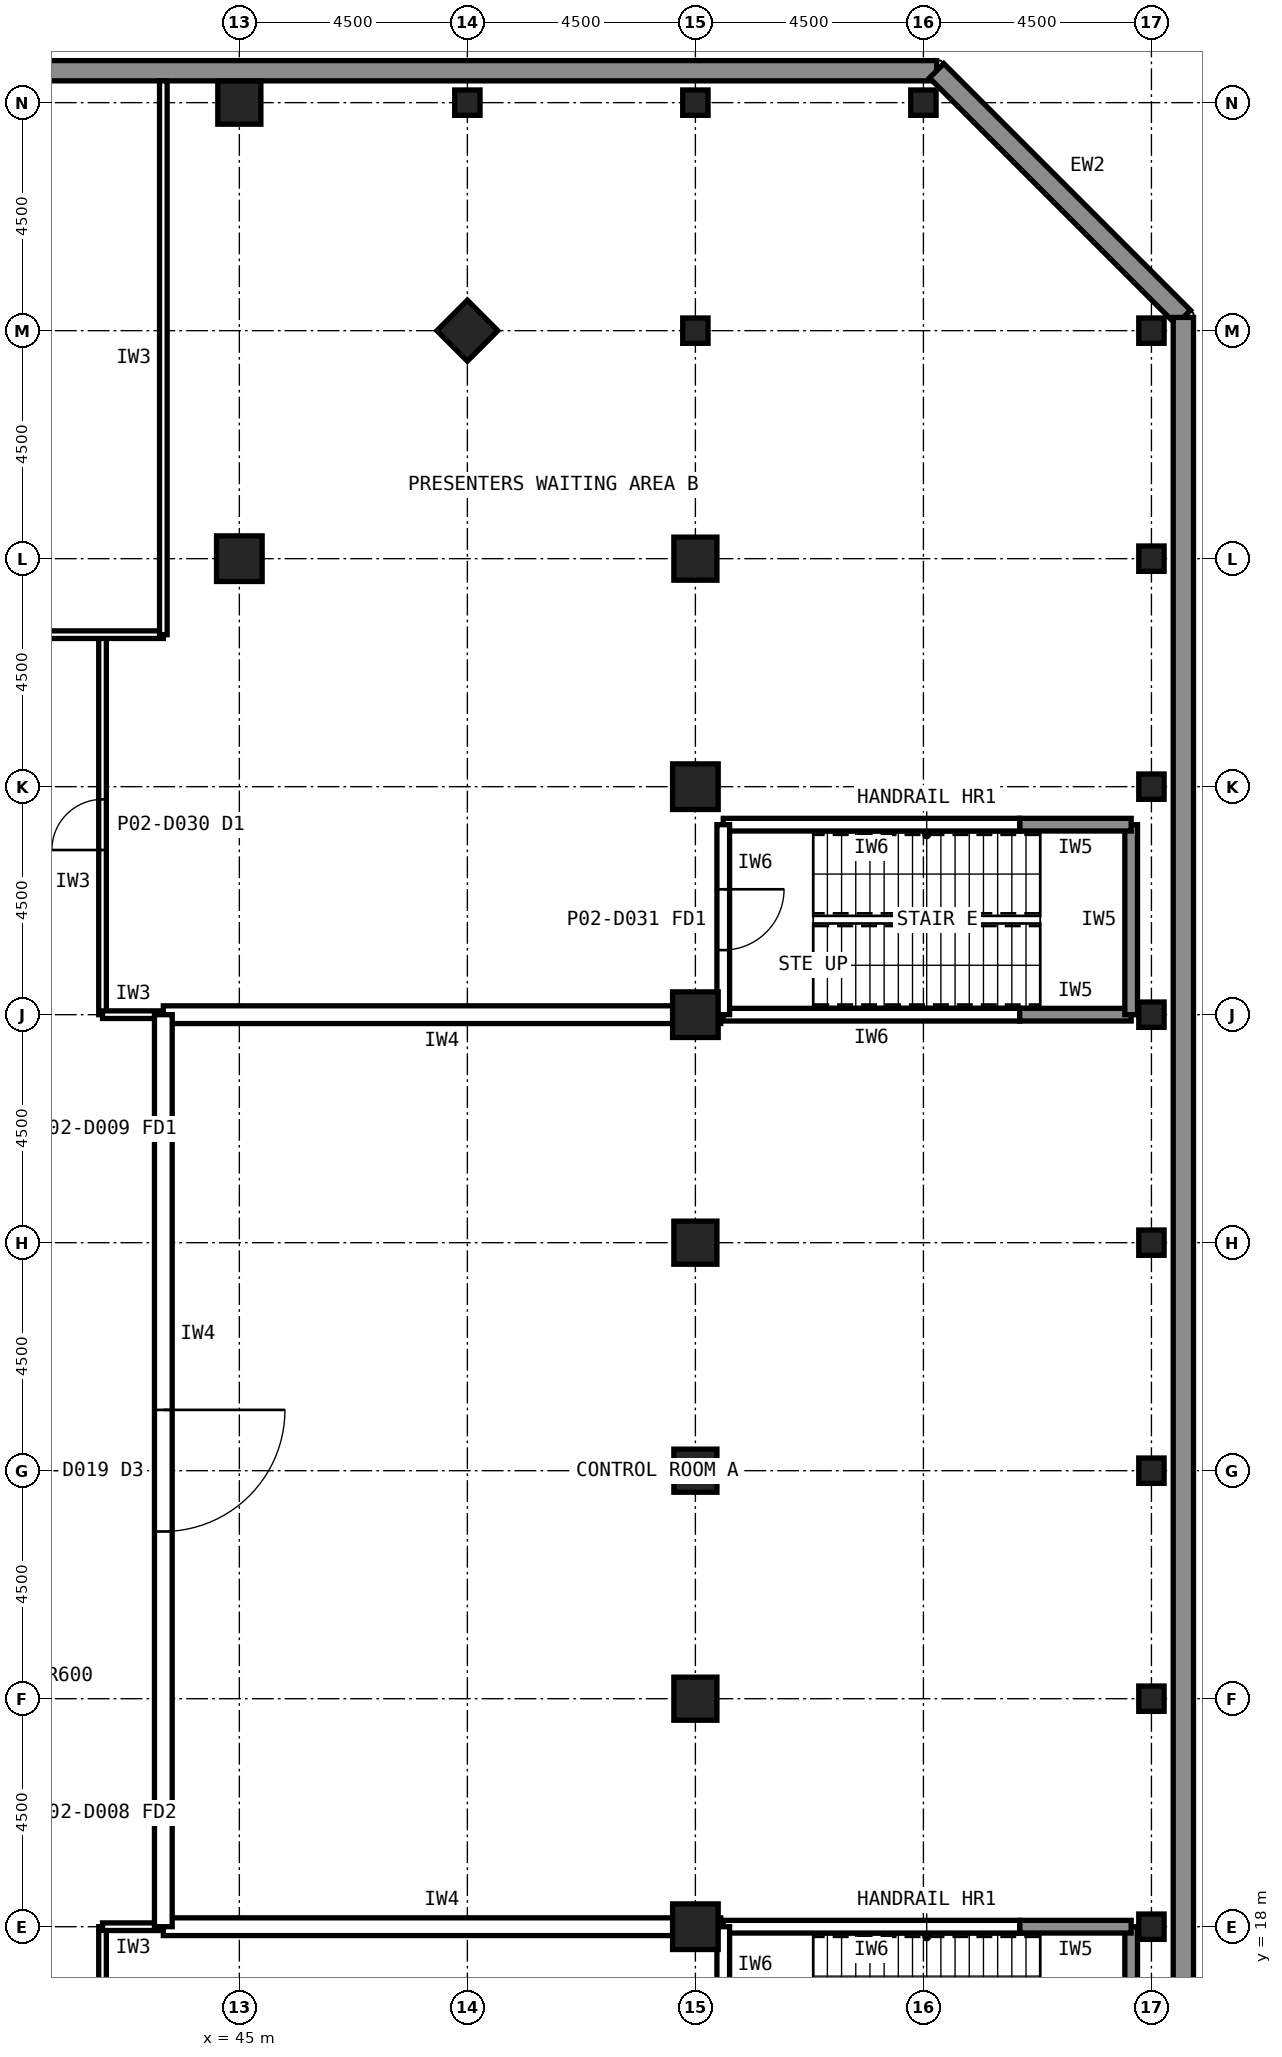
"""IFC4 building model, lengths in metres.
Left out: names, types, materials, properties, quantities, classifications, styles, units other than length and angle.
Written with IfcOpenShell. Run it as: python <this file> out.ifc"""

import sys

from ifc_helpers import new_model, si_unit, direction, frame, frame_2d, origin, origin_2d, place, context, subcontext, project, spatial, rectangle, hollow_rectangle, extrude, element, fill, save


model = new_model("IFC4")
c1 = context("Model", 3, precision=1e-05, world=origin(), true_north=direction((0.0, 1.0)))
c2 = subcontext(c1, "Body", "Model", "MODEL_VIEW")
j1 = project(units=[si_unit("LENGTHUNIT", "METRE"), si_unit("PLANEANGLEUNIT", "RADIAN")], contexts=[c1])
p1 = place(None, origin())
s1 = spatial("IfcSite", under=j1, at=p1, CompositionType="ELEMENT")
p2 = place(p1, origin())
s2 = spatial("IfcBuilding", under=s1, at=p2, CompositionType="ELEMENT")
p3 = place(p2, frame((0.0, 0.0, 6.0)))
s3 = spatial("IfcBuildingStorey", under=s2, at=p3, CompositionType="ELEMENT", Elevation=6.0)
p4 = place(p3, frame((54.0, 18.0, 0.0), z_axis=(0.0, 0.0, 1.0), x_axis=(1.0, 0.0, 0.0)))
e1 = element("IfcColumn", 1, at=p4, inside=s3, PredefinedType="COLUMN", context=c2, shape_type="SweptSolid", body=[
    extrude(hollow_rectangle(XDim=0.9, YDim=0.9, WallThickness=0.063, at=origin_2d()), origin(), (0.0, 0.0, 1.0), 6.0),
])
for number, where, z_axis, x_axis in (
    (2, (54.0, 22.5, 0.0), (0.0, 0.0, 1.0), (1.0, 0.0, 0.0)),
    (3, (54.0, 27.0, 0.0), (0.0, 0.0, 1.0), (1.0, 0.0, 0.0)),
    (4, (54.0, 31.5, 0.0), (0.0, 0.0, 1.0), (1.0, 0.0, 0.0)),
):
    element("IfcColumn", number, at=place(p3, frame(where, z_axis=z_axis, x_axis=x_axis)), inside=s3, PredefinedType="COLUMN", context=c2, shape_type="SweptSolid", body=[
        extrude(hollow_rectangle(XDim=0.85, YDim=0.85, WallThickness=0.05, at=origin_2d()), origin(), (0.0, 0.0, 1.0), 6.0),
    ])
for number, where, z_axis, x_axis in (
    (5, (54.0, 36.0, 0.0), (0.0, 0.0, 1.0), (1.0, 0.0, 0.0)),
    (6, (54.0, 40.5, 0.0), (0.0, 0.0, 1.0), (1.0, 0.0, 0.0)),
):
    element("IfcColumn", number, at=place(p3, frame(where, z_axis=z_axis, x_axis=x_axis)), inside=s3, PredefinedType="COLUMN", context=c2, shape_type="SweptSolid", body=[
        extrude(hollow_rectangle(XDim=0.9, YDim=0.9, WallThickness=0.063, at=origin_2d()), origin(), (0.0, 0.0, 1.0), 6.0),
    ])
for number, where, z_axis, x_axis in (
    (7, (54.0, 45.0, 0.0), (0.0, 0.0, 1.0), (1.0, 0.0, 0.0)),
    (8, (45.0, 54.0, 0.0), (0.0, 0.0, 1.0), (1.0, 0.0, 0.0)),
    (9, (49.5, 49.5, 0.0), (0.0, 0.0, 1.0), (0.707, 0.707, 0.0)),
):
    element("IfcColumn", number, at=place(p3, frame(where, z_axis=z_axis, x_axis=x_axis)), inside=s3, PredefinedType="COLUMN", context=c2, shape_type="SweptSolid", body=[
        extrude(hollow_rectangle(XDim=0.85, YDim=0.85, WallThickness=0.05, at=origin_2d()), origin(), (0.0, 0.0, 1.0), 6.0),
    ])
p5 = place(p3, frame((45.0, 45.0, 0.0), z_axis=(0.0, 0.0, 1.0), x_axis=(1.0, 0.0, 0.0)))
e10 = element("IfcColumn", 10, at=p5, inside=s3, PredefinedType="COLUMN", context=c2, shape_type="SweptSolid", body=[
    extrude(hollow_rectangle(XDim=0.9, YDim=0.9, WallThickness=0.063, at=origin_2d()), origin(), (0.0, 0.0, 1.0), 6.0),
])
for number, where, z_axis, x_axis in (
    (11, (63.0, 18.0, 0.0), (0.0, 0.0, 1.0), (1.0, 0.0, 0.0)),
    (12, (63.0, 22.5, 0.0), (0.0, 0.0, 1.0), (1.0, 0.0, 0.0)),
    (13, (63.0, 27.0, 0.0), (0.0, 0.0, 1.0), (1.0, 0.0, 0.0)),
    (14, (63.0, 31.5, 0.0), (0.0, 0.0, 1.0), (1.0, 0.0, 0.0)),
    (15, (63.0, 36.0, 0.0), (0.0, 0.0, 1.0), (1.0, 0.0, 0.0)),
    (16, (63.0, 40.5, 0.0), (0.0, 0.0, 1.0), (1.0, 0.0, 0.0)),
    (17, (63.0, 45.0, 0.0), (0.0, 0.0, 1.0), (1.0, 0.0, 0.0)),
    (18, (63.0, 49.5, 0.0), (0.0, 0.0, 1.0), (1.0, 0.0, 0.0)),
    (19, (58.5, 54.0, 0.0), (0.0, 0.0, 1.0), (1.0, 0.0, 0.0)),
    (20, (54.0, 54.0, 0.0), (0.0, 0.0, 1.0), (1.0, 0.0, 0.0)),
    (21, (49.5, 54.0, 0.0), (0.0, 0.0, 1.0), (1.0, 0.0, 0.0)),
    (22, (54.0, 49.5, 0.0), (0.0, 0.0, 1.0), (1.0, 0.0, 0.0)),
):
    element("IfcColumn", number, at=place(p3, frame(where, z_axis=z_axis, x_axis=x_axis)), inside=s3, PredefinedType="COLUMN", context=c2, shape_type="SweptSolid", body=[
        extrude(hollow_rectangle(XDim=0.5, YDim=0.5, WallThickness=0.022, at=origin_2d()), origin(), (0.0, 0.0, 1.0), 6.0),
    ])
p6 = place(p3, frame((-4.761, 54.63, 0.0), z_axis=(0.0, 0.0, 1.0), x_axis=(1.0, 0.0, 0.0)))
e23 = element("IfcWall", 23, at=p6, inside=s3, PredefinedType="SOLIDWALL", context=c2, shape_type="SweptSolid", body=[
    extrude(rectangle(XDim=63.522, YDim=0.4, at=frame_2d((31.761, 0.0))), origin(), (0.0, 0.0, 1.0), 6.0),
])
p7 = place(p3, frame((58.761, 54.63, 0.0), z_axis=(0.0, 0.0, 1.0), x_axis=(0.707106781187, -0.707106781187, 0.0)))
e24 = element("IfcWall", 24, at=p7, inside=s3, PredefinedType="SOLIDWALL", context=c2, shape_type="SweptSolid", body=[
    extrude(rectangle(XDim=6.886, YDim=0.4, at=frame_2d((3.443, 0.0))), origin(), (0.0, 0.0, 1.0), 6.0),
])
p8 = place(p3, frame((63.63, 49.761, 0.0), z_axis=(0.0, 0.0, 1.0), x_axis=(0.0, -1.0, 0.0)))
e25 = element("IfcWall", 25, at=p8, inside=s3, PredefinedType="SOLIDWALL", context=c2, shape_type="SweptSolid", body=[
    extrude(rectangle(XDim=45.522, YDim=0.4, at=frame_2d((22.761, 0.0))), origin(), (0.0, 0.0, 1.0), 6.0),
])
p9 = place(p3, frame((42.3, 10.5, 0.0), z_axis=(0.0, 0.0, 1.0), x_axis=(0.0, 1.0, 0.0)))
e26 = element("IfcWall", 26, at=p9, inside=s3, PredefinedType="PARTITIONING", context=c2, shape_type="SweptSolid", body=[
    extrude(rectangle(XDim=7.5, YDim=0.15, at=frame_2d((3.75, 0.0))), origin(), (0.0, 0.0, 1.0), 5.8),
])
p10 = place(p9, frame((3.25, 0.0, 0.0)))
e27 = element("IfcOpeningElement", 27, at=p10, cuts=e26, PredefinedType="OPENING", context=c2, shape_type="SweptSolid", body=[
    extrude(rectangle(XDim=1.0, YDim=2.1, at=frame_2d((0.5, 1.05))), frame((0.0, 0.085, 0.0), z_axis=(0.0, -1.0, 0.0), x_axis=(1.0, 0.0, 0.0)), (0.0, 0.0, 1.0), 0.17),
])
p11 = place(p3, frame((42.3, 18.0, 0.0), z_axis=(0.0, 0.0, 1.0), x_axis=(1.0, 0.0, 0.0)))
e28 = element("IfcWall", 28, at=p11, inside=s3, PredefinedType="PARTITIONING", context=c2, shape_type="SweptSolid", body=[
    extrude(rectangle(XDim=1.21, YDim=0.15, at=frame_2d((0.605, 0.0))), origin(), (0.0, 0.0, 1.0), 4.881),
])
p12 = place(p3, frame((42.3, 36.0, 0.0), z_axis=(0.0, 0.0, 1.0), x_axis=(0.0, 1.0, 0.0)))
e29 = element("IfcWall", 29, at=p12, inside=s3, PredefinedType="PARTITIONING", context=c2, shape_type="SweptSolid", body=[
    extrude(rectangle(XDim=7.5, YDim=0.15, at=frame_2d((3.75, 0.0))), origin(), (0.0, 0.0, 1.0), 5.8),
])
p13 = place(p12, frame((3.25, 0.0, 0.0)))
e30 = element("IfcOpeningElement", 30, at=p13, cuts=e29, PredefinedType="OPENING", context=c2, shape_type="SweptSolid", body=[
    extrude(rectangle(XDim=1.0, YDim=2.1, at=frame_2d((0.5, 1.05))), frame((0.0, 0.085, 0.0), z_axis=(0.0, -1.0, 0.0), x_axis=(1.0, 0.0, 0.0)), (0.0, 0.0, 1.0), 0.17),
])
p14 = place(p3, frame((43.51, 36.0, 0.0), z_axis=(0.0, 0.0, 1.0), x_axis=(-1.0, 0.0, 0.0)))
e31 = element("IfcWall", 31, at=p14, inside=s3, PredefinedType="PARTITIONING", context=c2, shape_type="SweptSolid", body=[
    extrude(rectangle(XDim=1.21, YDim=0.15, at=frame_2d((0.605, 0.0))), origin(), (0.0, 0.0, 1.0), 4.881),
])
for number, where, z_axis, x_axis in (
    (32, (43.5, 18.0, 0.0), (0.0, 0.0, 1.0), (1.0, 0.0, 0.0)),
    (33, (54.5, 36.0, 0.0), (0.0, 0.0, 1.0), (-1.0, 0.0, 0.0)),
):
    element("IfcWall", number, at=place(p3, frame(where, z_axis=z_axis, x_axis=x_axis)), inside=s3, PredefinedType="PARTITIONING", context=c2, shape_type="SweptSolid", body=[
        extrude(rectangle(XDim=11.0, YDim=0.35, at=frame_2d((5.5, 0.0))), origin(), (0.0, 0.0, 1.0), 4.881),
    ])
p15 = place(p3, frame((43.5, 36.0, 0.0), z_axis=(0.0, 0.0, 1.0), x_axis=(0.0, -1.0, 0.0)))
e34 = element("IfcWall", 34, at=p15, inside=s3, PredefinedType="PARTITIONING", context=c2, shape_type="SweptSolid", body=[
    extrude(rectangle(XDim=18.0, YDim=0.35, at=frame_2d((9.0, 0.0))), origin(), (0.0, 0.0, 1.0), 5.8),
])
p16 = place(p15, frame((7.8, 0.0, 0.0)))
e35 = element("IfcOpeningElement", 35, at=p16, cuts=e34, PredefinedType="OPENING", context=c2, shape_type="SweptSolid", body=[
    extrude(rectangle(XDim=2.4, YDim=3.0, at=frame_2d((1.2, 1.5))), frame((0.0, 0.185, 0.0), z_axis=(0.0, -1.0, 0.0), x_axis=(1.0, 0.0, 0.0)), (0.0, 0.0, 1.0), 0.37),
])
p17 = place(p3, frame((10.5, 43.5, 0.0), z_axis=(0.0, 0.0, 1.0), x_axis=(1.0, 0.0, 0.0)))
e36 = element("IfcWall", 36, at=p17, inside=s3, PredefinedType="PARTITIONING", context=c2, shape_type="SweptSolid", body=[
    extrude(rectangle(XDim=33.0, YDim=0.15, at=frame_2d((16.5, 0.0))), origin(), (0.0, 0.0, 1.0), 5.8),
])
p18 = place(p17, frame((16.0, 0.0, 0.0)))
e37 = element("IfcOpeningElement", 37, at=p18, cuts=e36, PredefinedType="OPENING", context=c2, shape_type="SweptSolid", body=[
    extrude(rectangle(XDim=1.0, YDim=2.1, at=frame_2d((0.5, 1.05))), frame((0.0, 0.085, 0.0), z_axis=(0.0, -1.0, 0.0), x_axis=(1.0, 0.0, 0.0)), (0.0, 0.0, 1.0), 0.17),
])
p19 = place(p3, frame((43.5, 43.5, 0.0), z_axis=(0.0, 0.0, 1.0), x_axis=(0.0, 1.0, 0.0)))
e38 = element("IfcWall", 38, at=p19, inside=s3, PredefinedType="PARTITIONING", context=c2, shape_type="SweptSolid", body=[
    extrude(rectangle(XDim=10.93, YDim=0.15, at=frame_2d((5.465, 0.0))), origin(), (0.0, 0.0, 1.0), 5.8),
])
p20 = place(p3, frame((62.6, 14.25, 0.0), z_axis=(0.0, 0.0, 1.0), x_axis=(0.0, 1.0, 0.0)))
e39 = element("IfcWall", 39, at=p20, inside=s3, PredefinedType="SOLIDWALL", context=c2, shape_type="SweptSolid", body=[
    extrude(rectangle(XDim=3.75, YDim=0.25, at=frame_2d((1.875, 0.0))), origin(), (0.0, 0.0, 1.0), 6.0),
])
p21 = place(p3, frame((62.6, 18.0, 0.0), z_axis=(0.0, 0.0, 1.0), x_axis=(-1.0, 0.0, 0.0)))
e40 = element("IfcWall", 40, at=p21, inside=s3, PredefinedType="SOLIDWALL", context=c2, shape_type="SweptSolid", body=[
    extrude(rectangle(XDim=2.2, YDim=0.25, at=frame_2d((1.1, 0.0))), origin(), (0.0, 0.0, 1.0), 5.189),
])
p22 = place(p3, frame((60.4, 18.0, 0.0), z_axis=(0.0, 0.0, 1.0), x_axis=(-1.0, 0.0, 0.0)))
e41 = element("IfcWall", 41, at=p22, inside=s3, PredefinedType="PARTITIONING", context=c2, shape_type="SweptSolid", body=[
    extrude(rectangle(XDim=5.85, YDim=0.25, at=frame_2d((2.925, 0.0))), origin(), (0.0, 0.0, 1.0), 5.189),
])
p23 = place(p3, frame((54.55, 18.0, 0.0), z_axis=(0.0, 0.0, 1.0), x_axis=(0.0, -1.0, 0.0)))
e42 = element("IfcWall", 42, at=p23, inside=s3, PredefinedType="PARTITIONING", context=c2, shape_type="SweptSolid", body=[
    extrude(rectangle(XDim=3.75, YDim=0.25, at=frame_2d((1.875, 0.0))), origin(), (0.0, 0.0, 1.0), 5.8),
])
p24 = place(p23, frame((1.275, 0.0, 0.0)))
e43 = element("IfcOpeningElement", 43, at=p24, cuts=e42, PredefinedType="OPENING", context=c2, shape_type="SweptSolid", body=[
    extrude(rectangle(XDim=1.2, YDim=2.1, at=frame_2d((0.6, 1.05))), frame((0.0, 0.135, 0.0), z_axis=(0.0, -1.0, 0.0), x_axis=(1.0, 0.0, 0.0)), (0.0, 0.0, 1.0), 0.27),
])
p25 = place(p3, frame((54.55, 36.0, 0.0), z_axis=(0.0, 0.0, 1.0), x_axis=(1.0, 0.0, 0.0)))
e44 = element("IfcWall", 44, at=p25, inside=s3, PredefinedType="PARTITIONING", context=c2, shape_type="SweptSolid", body=[
    extrude(rectangle(XDim=5.85, YDim=0.25, at=frame_2d((2.925, 0.0))), origin(), (0.0, 0.0, 1.0), 5.189),
])
p26 = place(p3, frame((60.4, 36.0, 0.0), z_axis=(0.0, 0.0, 1.0), x_axis=(1.0, 0.0, 0.0)))
e45 = element("IfcWall", 45, at=p26, inside=s3, PredefinedType="SOLIDWALL", context=c2, shape_type="SweptSolid", body=[
    extrude(rectangle(XDim=2.2, YDim=0.25, at=frame_2d((1.1, 0.0))), origin(), (0.0, 0.0, 1.0), 5.189),
])
p27 = place(p3, frame((62.6, 36.0, 0.0), z_axis=(0.0, 0.0, 1.0), x_axis=(0.0, 1.0, 0.0)))
e46 = element("IfcWall", 46, at=p27, inside=s3, PredefinedType="SOLIDWALL", context=c2, shape_type="SweptSolid", body=[
    extrude(rectangle(XDim=3.75, YDim=0.25, at=frame_2d((1.875, 0.0))), origin(), (0.0, 0.0, 1.0), 6.0),
])
p28 = place(p3, frame((62.6, 39.75, 0.0), z_axis=(0.0, 0.0, 1.0), x_axis=(-1.0, 0.0, 0.0)))
e47 = element("IfcWall", 47, at=p28, inside=s3, PredefinedType="SOLIDWALL", context=c2, shape_type="SweptSolid", body=[
    extrude(rectangle(XDim=2.2, YDim=0.25, at=frame_2d((1.1, 0.0))), origin(), (0.0, 0.0, 1.0), 6.0),
])
p29 = place(p3, frame((60.4, 39.75, 0.0), z_axis=(0.0, 0.0, 1.0), x_axis=(-1.0, 0.0, 0.0)))
e48 = element("IfcWall", 48, at=p29, inside=s3, PredefinedType="PARTITIONING", context=c2, shape_type="SweptSolid", body=[
    extrude(rectangle(XDim=5.85, YDim=0.25, at=frame_2d((2.925, 0.0))), origin(), (0.0, 0.0, 1.0), 5.8),
])
p30 = place(p3, frame((54.55, 39.75, 0.0), z_axis=(0.0, 0.0, 1.0), x_axis=(0.0, -1.0, 0.0)))
e49 = element("IfcWall", 49, at=p30, inside=s3, PredefinedType="PARTITIONING", context=c2, shape_type="SweptSolid", body=[
    extrude(rectangle(XDim=3.75, YDim=0.25, at=frame_2d((1.875, 0.0))), origin(), (0.0, 0.0, 1.0), 5.8),
])
p31 = place(p30, frame((1.275, 0.0, 0.0)))
e50 = element("IfcOpeningElement", 50, at=p31, cuts=e49, PredefinedType="OPENING", context=c2, shape_type="SweptSolid", body=[
    extrude(rectangle(XDim=1.2, YDim=2.1, at=frame_2d((0.6, 1.05))), frame((0.0, 0.135, 0.0), z_axis=(0.0, -1.0, 0.0), x_axis=(1.0, 0.0, 0.0)), (0.0, 0.0, 1.0), 0.27),
])
p32 = place(p13, origin())
e51 = element("IfcDoor", 51, at=p32, inside=s3, OperationType="SINGLE_SWING_LEFT", PredefinedType="DOOR", context=c2, shape_type="SweptSolid", body=[
    extrude(rectangle(XDim=1.0, YDim=2.1, at=frame_2d((0.5, 1.05))), frame((0.0, 0.025, 0.0), z_axis=(0.0, -1.0, 0.0), x_axis=(1.0, 0.0, 0.0)), (0.0, 0.0, 1.0), 0.05),
])
fill(e30, e51)
p33 = place(p16, origin())
e52 = element("IfcDoor", 52, at=p33, inside=s3, OperationType="SINGLE_SWING_LEFT", PredefinedType="DOOR", context=c2, shape_type="SweptSolid", body=[
    extrude(rectangle(XDim=2.4, YDim=3.0, at=frame_2d((1.2, 1.5))), frame((0.0, 0.025, 0.0), z_axis=(0.0, -1.0, 0.0), x_axis=(1.0, 0.0, 0.0)), (0.0, 0.0, 1.0), 0.05),
])
fill(e35, e52)
p34 = place(p31, origin())
e53 = element("IfcDoor", 53, at=p34, inside=s3, OperationType="SINGLE_SWING_LEFT", PredefinedType="DOOR", context=c2, shape_type="SweptSolid", body=[
    extrude(rectangle(XDim=1.2, YDim=2.1, at=frame_2d((0.6, 1.05))), frame((0.0, 0.025, 0.0), z_axis=(0.0, -1.0, 0.0), x_axis=(1.0, 0.0, 0.0)), (0.0, 0.0, 1.0), 0.05),
])
fill(e50, e53)
save(model, sys.argv[1])
